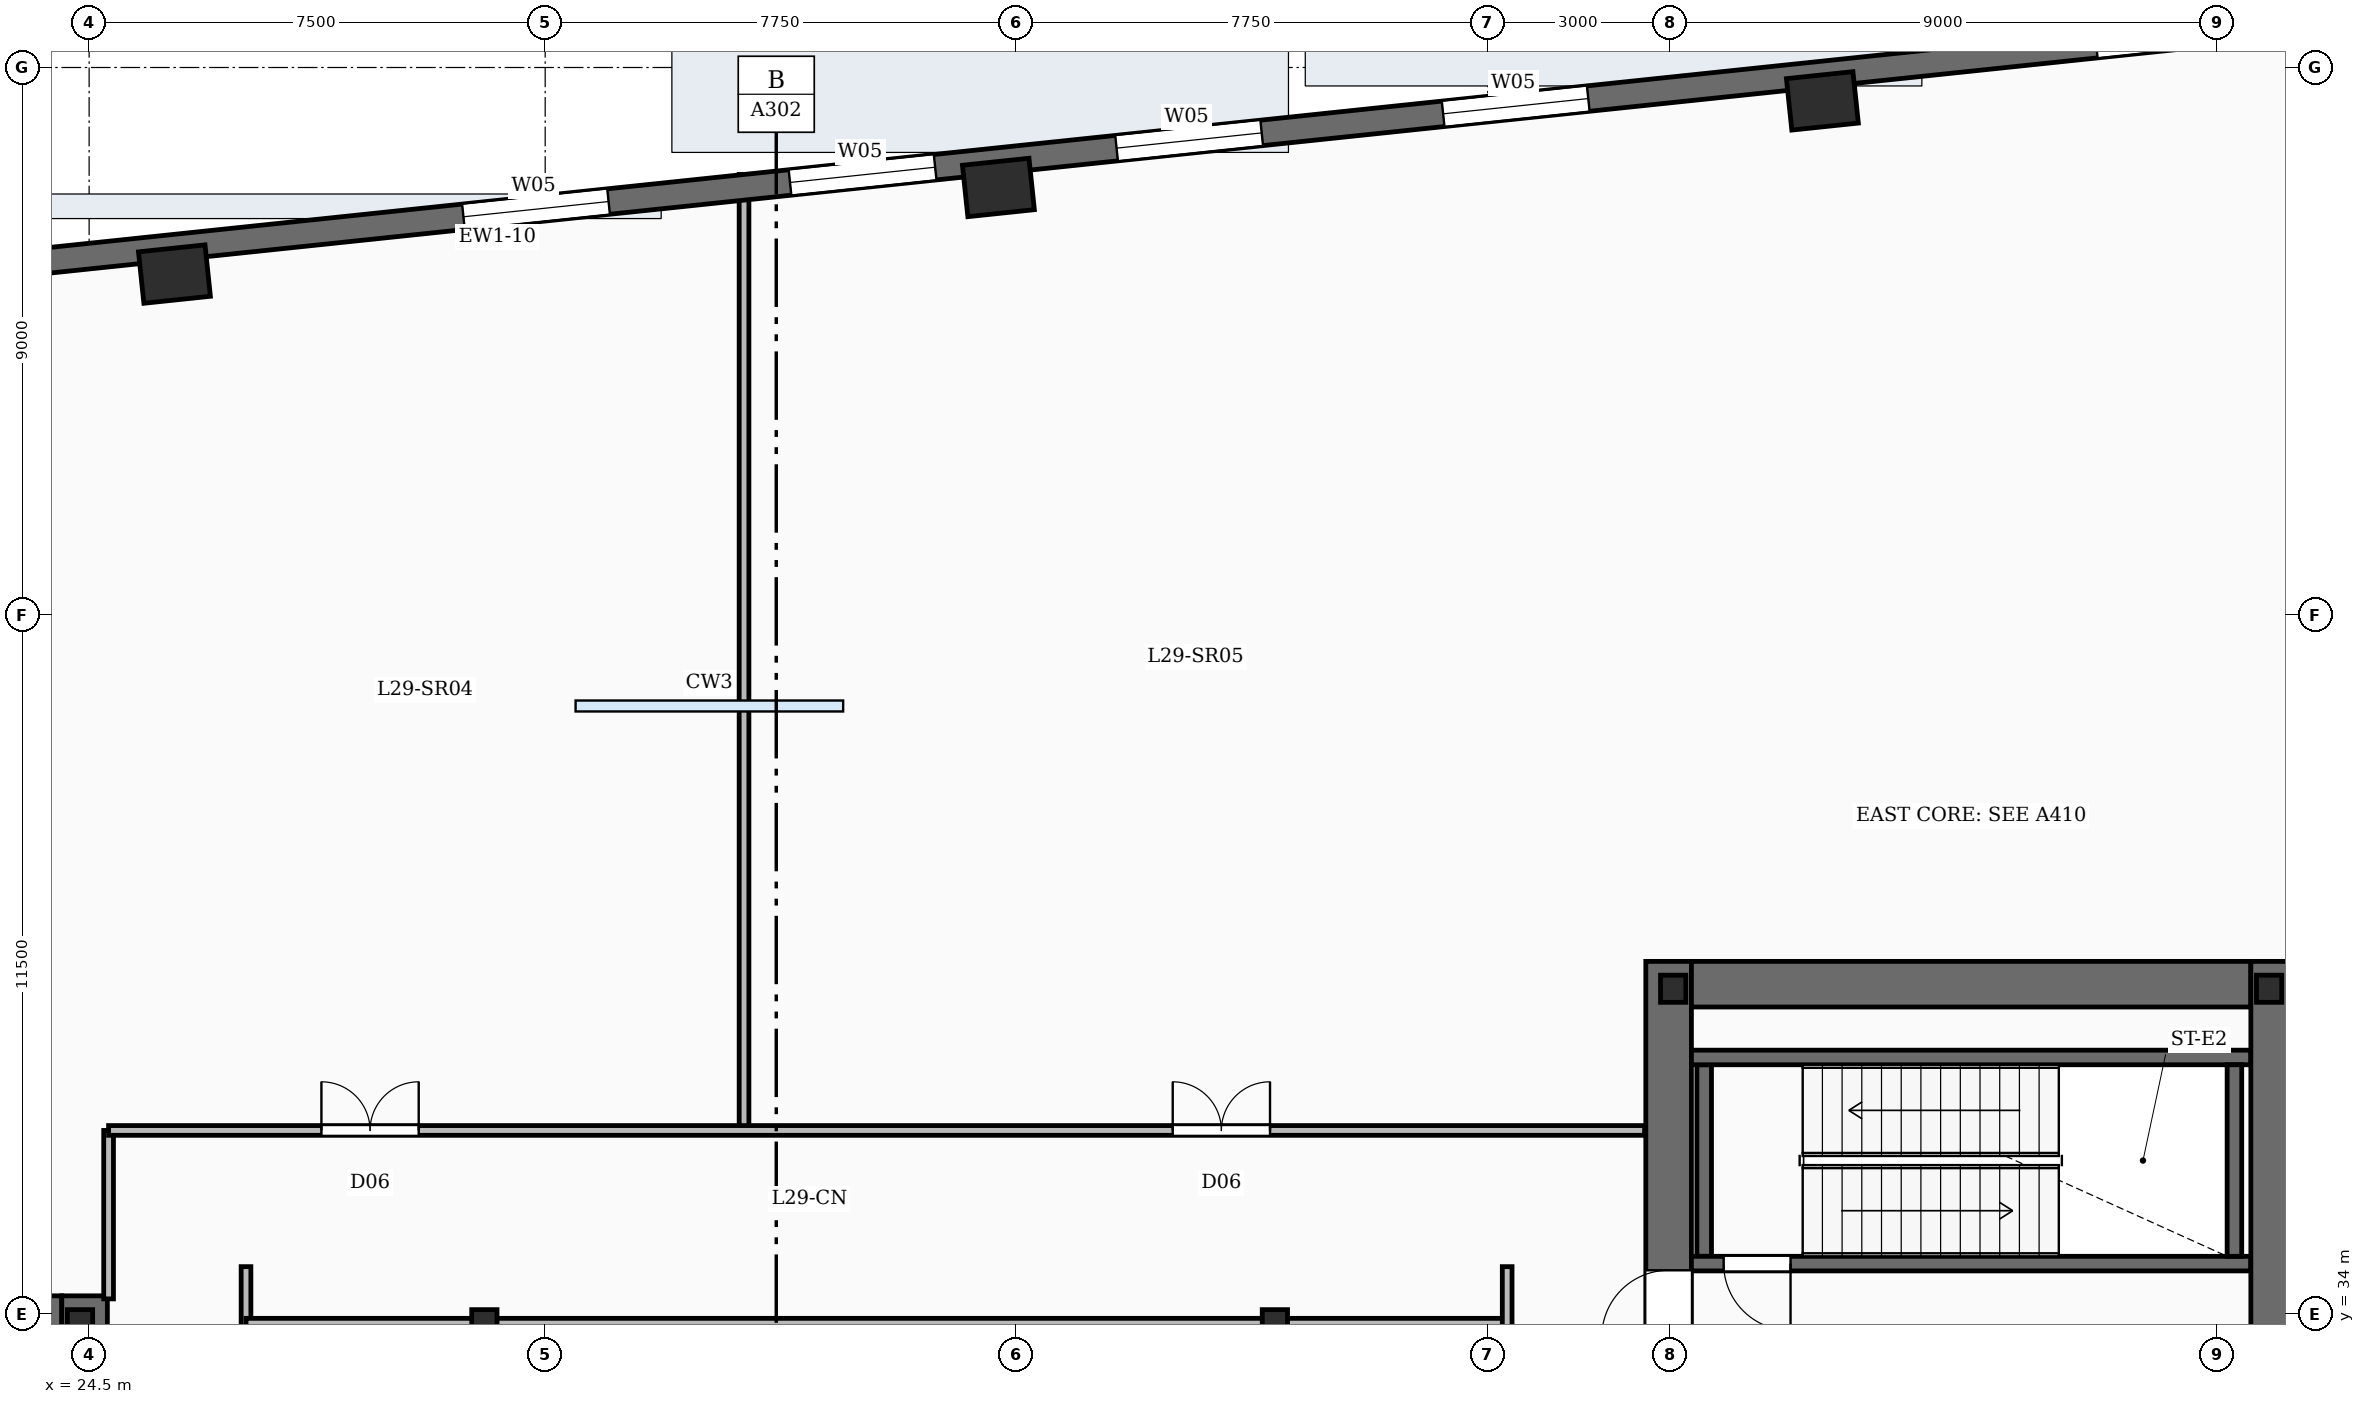
"""IFC4 building model, lengths in metres.
Left out: names, types, materials, properties, quantities, classifications, styles, units other than length and angle.
Written with IfcOpenShell. Run it as: python <this file> out.ifc"""

import sys

from ifc_helpers import new_model, si_unit, direction, frame, frame_2d, origin, origin_2d, place, context, subcontext, project, spatial, rectangle, i_section, extrude, element, fill, save


model = new_model("IFC4")
c1 = context("Model", 3, precision=1e-05, world=origin(), true_north=direction((0.0, 1.0)))
c2 = subcontext(c1, "Body", "Model", "MODEL_VIEW")
j1 = project(units=[si_unit("LENGTHUNIT", "METRE"), si_unit("PLANEANGLEUNIT", "RADIAN")], contexts=[c1])
p1 = place(None, origin())
s1 = spatial("IfcSite", under=j1, at=p1, CompositionType="ELEMENT")
p2 = place(p1, origin())
s2 = spatial("IfcBuilding", under=s1, at=p2, CompositionType="ELEMENT")
p3 = place(p2, frame((0.0, 0.0, 125.95)))
s3 = spatial("IfcBuildingStorey", under=s2, at=p3, CompositionType="ELEMENT", Elevation=125.95)
p4 = place(p3, frame((24.425, 19.0, -0.31), z_axis=(0.0, 0.0, 1.0), x_axis=(0.0, 1.0, 0.0)))
e1 = element("IfcWall", 1, at=p4, inside=s3, PredefinedType="SHEAR", context=c2, shape_type="SweptSolid", body=[
    extrude(rectangle(XDim=15.3, YDim=0.75, at=frame_2d((7.65, 0.0))), origin(), (0.0, 0.0, 1.0), 4.84),
])
p5 = place(p4, frame((2.5, 0.0, 0.31)))
e2 = element("IfcOpeningElement", 2, at=p5, cuts=e1, PredefinedType="OPENING", context=c2, shape_type="SweptSolid", body=[
    extrude(rectangle(XDim=1.05, YDim=2.15, at=frame_2d((0.525, 1.075))), frame((0.0, 0.385, 0.0), z_axis=(0.0, -1.0, 0.0), x_axis=(1.0, 0.0, 0.0)), (0.0, 0.0, 1.0), 0.77),
])
p6 = place(p4, frame((7.0, 0.0, 0.31)))
e3 = element("IfcOpeningElement", 3, at=p6, cuts=e1, PredefinedType="OPENING", context=c2, shape_type="SweptSolid", body=[
    extrude(rectangle(XDim=1.05, YDim=2.15, at=frame_2d((0.525, 1.075))), frame((0.0, 0.385, 0.0), z_axis=(0.0, -1.0, 0.0), x_axis=(1.0, 0.0, 0.0)), (0.0, 0.0, 1.0), 0.77),
])
p7 = place(p3, frame((14.85, 33.925, -0.31), z_axis=(0.0, 0.0, 1.0), x_axis=(1.0, 0.0, 0.0)))
e4 = element("IfcWall", 4, at=p7, inside=s3, PredefinedType="SHEAR", context=c2, shape_type="SweptSolid", body=[
    extrude(rectangle(XDim=9.2, YDim=0.75, at=frame_2d((4.6, 0.0))), origin(), (0.0, 0.0, 1.0), 4.84),
])
p8 = place(p3, frame((50.475, 19.0, -0.31), z_axis=(0.0, 0.0, 1.0), x_axis=(0.0, 1.0, 0.0)))
e5 = element("IfcWall", 5, at=p8, inside=s3, PredefinedType="SHEAR", context=c2, shape_type="SweptSolid", body=[
    extrude(rectangle(XDim=20.8, YDim=0.75, at=frame_2d((10.4, 0.0))), origin(), (0.0, 0.0, 1.0), 4.84),
])
p9 = place(p8, frame((2.5, 0.0, 0.31)))
e6 = element("IfcOpeningElement", 6, at=p9, cuts=e5, PredefinedType="OPENING", context=c2, shape_type="SweptSolid", body=[
    extrude(rectangle(XDim=1.05, YDim=2.15, at=frame_2d((0.525, 1.075))), frame((0.0, 0.385, 0.0), z_axis=(0.0, -1.0, 0.0), x_axis=(1.0, 0.0, 0.0)), (0.0, 0.0, 1.0), 0.77),
])
p10 = place(p8, frame((8.65, 0.0, 0.31)))
e7 = element("IfcOpeningElement", 7, at=p10, cuts=e5, PredefinedType="OPENING", context=c2, shape_type="SweptSolid", body=[
    extrude(rectangle(XDim=1.05, YDim=2.15, at=frame_2d((0.525, 1.075))), frame((0.0, 0.385, 0.0), z_axis=(0.0, -1.0, 0.0), x_axis=(1.0, 0.0, 0.0)), (0.0, 0.0, 1.0), 0.77),
])
p11 = place(p8, frame((14.62, 0.0, 0.31)))
e8 = element("IfcOpeningElement", 8, at=p11, cuts=e5, PredefinedType="OPENING", context=c2, shape_type="SweptSolid", body=[
    extrude(rectangle(XDim=1.1, YDim=2.15, at=frame_2d((0.55, 1.075))), frame((0.0, 0.385, 0.0), z_axis=(0.0, -1.0, 0.0), x_axis=(1.0, 0.0, 0.0)), (0.0, 0.0, 1.0), 0.77),
])
p12 = place(p3, frame((60.425, 19.0, -0.31), z_axis=(0.0, 0.0, 1.0), x_axis=(0.0, 1.0, 0.0)))
e9 = element("IfcWall", 9, at=p12, inside=s3, PredefinedType="SHEAR", context=c2, shape_type="SweptSolid", body=[
    extrude(rectangle(XDim=20.8, YDim=0.75, at=frame_2d((10.4, 0.0))), origin(), (0.0, 0.0, 1.0), 4.84),
])
p13 = place(p3, frame((50.85, 39.425, -0.31), z_axis=(0.0, 0.0, 1.0), x_axis=(1.0, 0.0, 0.0)))
e10 = element("IfcWall", 10, at=p13, inside=s3, PredefinedType="SHEAR", context=c2, shape_type="SweptSolid", body=[
    extrude(rectangle(XDim=9.2, YDim=0.75, at=frame_2d((4.6, 0.0))), origin(), (0.0, 0.0, 1.0), 4.84),
])
for number, where, z_axis, x_axis in (
    (11, (24.35, 33.85, -0.31), (0.0, 0.0, 1.0), (1.0, 0.0, 0.0)),
    (12, (50.55, 39.35, -0.31), (0.0, 0.0, 1.0), (1.0, 0.0, 0.0)),
    (13, (60.35, 39.35, -0.31), (0.0, 0.0, 1.0), (1.0, 0.0, 0.0)),
    (14, (31.0, 33.85, -0.31), (0.0, 0.0, 1.0), (1.0, 0.0, 0.0)),
    (15, (44.0, 33.85, -0.31), (0.0, 0.0, 1.0), (1.0, 0.0, 0.0)),
):
    element("IfcColumn", number, at=place(p3, frame(where, z_axis=z_axis, x_axis=x_axis)), inside=s3, PredefinedType="COLUMN", context=c2, shape_type="SweptSolid", body=[
        extrude(i_section(OverallWidth=0.416, OverallDepth=0.446, WebThickness=0.039, FlangeThickness=0.063, FilletRadius=0.02, at=origin_2d()), origin(), (0.0, 0.0, 1.0), 4.84),
    ])
for number, where, z_axis, x_axis in (
    (16, (53.004, 53.951, -0.31), (0.0, 0.0, 1.0), (0.995, 0.105, 0.0)),
    (17, (39.453, 52.527, -0.31), (0.0, 0.0, 1.0), (0.995, 0.105, 0.0)),
    (18, (25.903, 51.103, -0.31), (0.0, 0.0, 1.0), (0.995, 0.105, 0.0)),
):
    element("IfcColumn", number, at=place(p3, frame(where, z_axis=z_axis, x_axis=x_axis)), inside=s3, PredefinedType="COLUMN", context=c2, shape_type="SweptSolid", body=[
        extrude(rectangle(XDim=1.1, YDim=0.85, at=origin_2d()), origin(), (0.0, 0.0, 1.0), 4.84),
    ])
p14 = place(p3, frame((11.958, 50.08, 0.0), z_axis=(0.0, 0.0, 1.0), x_axis=(0.994521823388, 0.104529148113, 0.0)))
e19 = element("IfcWall", 19, at=p14, inside=s3, PredefinedType="SOLIDWALL", context=c2, shape_type="SweptSolid", body=[
    extrude(rectangle(XDim=55.2, YDim=0.42, at=frame_2d((27.6, 0.0))), origin(), (0.0, 0.0, 1.0), 4.53),
])
p15 = place(p14, frame((2.6, 0.0, 0.85)))
e20 = element("IfcOpeningElement", 20, at=p15, cuts=e19, PredefinedType="OPENING", context=c2, shape_type="SweptSolid", body=[
    extrude(rectangle(XDim=2.4, YDim=3.0, at=frame_2d((1.2, 1.5))), frame((0.0, 0.22, 0.0), z_axis=(0.0, -1.0, 0.0), x_axis=(1.0, 0.0, 0.0)), (0.0, 0.0, 1.0), 0.44),
])
p16 = place(p14, frame((8.0, 0.0, 0.85)))
e21 = element("IfcOpeningElement", 21, at=p16, cuts=e19, PredefinedType="OPENING", context=c2, shape_type="SweptSolid", body=[
    extrude(rectangle(XDim=2.4, YDim=3.0, at=frame_2d((1.2, 1.5))), frame((0.0, 0.22, 0.0), z_axis=(0.0, -1.0, 0.0), x_axis=(1.0, 0.0, 0.0)), (0.0, 0.0, 1.0), 0.44),
])
p17 = place(p14, frame((18.8, 0.0, 0.85)))
e22 = element("IfcOpeningElement", 22, at=p17, cuts=e19, PredefinedType="OPENING", context=c2, shape_type="SweptSolid", body=[
    extrude(rectangle(XDim=2.4, YDim=3.0, at=frame_2d((1.2, 1.5))), frame((0.0, 0.22, 0.0), z_axis=(0.0, -1.0, 0.0), x_axis=(1.0, 0.0, 0.0)), (0.0, 0.0, 1.0), 0.44),
])
p18 = place(p14, frame((24.2, 0.0, 0.85)))
e23 = element("IfcOpeningElement", 23, at=p18, cuts=e19, PredefinedType="OPENING", context=c2, shape_type="SweptSolid", body=[
    extrude(rectangle(XDim=2.4, YDim=3.0, at=frame_2d((1.2, 1.5))), frame((0.0, 0.22, 0.0), z_axis=(0.0, -1.0, 0.0), x_axis=(1.0, 0.0, 0.0)), (0.0, 0.0, 1.0), 0.44),
])
p19 = place(p14, frame((29.6, 0.0, 0.85)))
e24 = element("IfcOpeningElement", 24, at=p19, cuts=e19, PredefinedType="OPENING", context=c2, shape_type="SweptSolid", body=[
    extrude(rectangle(XDim=2.4, YDim=3.0, at=frame_2d((1.2, 1.5))), frame((0.0, 0.22, 0.0), z_axis=(0.0, -1.0, 0.0), x_axis=(1.0, 0.0, 0.0)), (0.0, 0.0, 1.0), 0.44),
])
p20 = place(p14, frame((35.0, 0.0, 0.85)))
e25 = element("IfcOpeningElement", 25, at=p20, cuts=e19, PredefinedType="OPENING", context=c2, shape_type="SweptSolid", body=[
    extrude(rectangle(XDim=2.4, YDim=3.0, at=frame_2d((1.2, 1.5))), frame((0.0, 0.22, 0.0), z_axis=(0.0, -1.0, 0.0), x_axis=(1.0, 0.0, 0.0)), (0.0, 0.0, 1.0), 0.44),
])
p21 = place(p14, frame((45.8, 0.0, 0.85)))
e26 = element("IfcOpeningElement", 26, at=p21, cuts=e19, PredefinedType="OPENING", context=c2, shape_type="SweptSolid", body=[
    extrude(rectangle(XDim=2.4, YDim=3.0, at=frame_2d((1.2, 1.5))), frame((0.0, 0.22, 0.0), z_axis=(0.0, -1.0, 0.0), x_axis=(1.0, 0.0, 0.0)), (0.0, 0.0, 1.0), 0.44),
])
p22 = place(p3, frame((60.05, 34.83, 0.0), z_axis=(0.0, 0.0, 1.0), x_axis=(-1.0, 0.0, 0.0)))
e27 = element("IfcWall", 27, at=p22, inside=s3, PredefinedType="SOLIDWALL", context=c2, shape_type="SweptSolid", body=[
    extrude(rectangle(XDim=9.2, YDim=0.24, at=frame_2d((4.6, 0.0))), origin(), (0.0, 0.0, 1.0), 4.53),
])
p23 = place(p22, frame((7.57, 0.0, 0.0)))
e28 = element("IfcOpeningElement", 28, at=p23, cuts=e27, PredefinedType="OPENING", context=c2, shape_type="SweptSolid", body=[
    extrude(rectangle(XDim=1.1, YDim=2.15, at=frame_2d((0.55, 1.075))), frame((0.0, 0.13, 0.0), z_axis=(0.0, -1.0, 0.0), x_axis=(1.0, 0.0, 0.0)), (0.0, 0.0, 1.0), 0.26),
])
p24 = place(p3, frame((50.85, 38.22, 0.0), z_axis=(0.0, 0.0, 1.0), x_axis=(1.0, 0.0, 0.0)))
e29 = element("IfcWall", 29, at=p24, inside=s3, PredefinedType="SOLIDWALL", context=c2, shape_type="SweptSolid", body=[
    extrude(rectangle(XDim=9.2, YDim=0.24, at=frame_2d((4.6, 0.0))), origin(), (0.0, 0.0, 1.0), 4.53),
])
for number, where, z_axis, x_axis in (
    (30, (51.06, 34.95, 0.0), (0.0, 0.0, 1.0), (0.0, 1.0, 0.0)),
    (31, (59.78, 34.95, 0.0), (0.0, 0.0, 1.0), (0.0, 1.0, 0.0)),
):
    element("IfcWall", number, at=place(p3, frame(where, z_axis=z_axis, x_axis=x_axis)), inside=s3, PredefinedType="SOLIDWALL", context=c2, shape_type="SweptSolid", body=[
        extrude(rectangle(XDim=3.15, YDim=0.24, at=frame_2d((1.575, 0.0))), origin(), (0.0, 0.0, 1.0), 4.53),
    ])
p25 = place(p3, frame((27.08, 33.85, 0.0), z_axis=(0.0, 0.0, 1.0), x_axis=(1.0, 0.0, 0.0)))
e32 = element("IfcWall", 32, at=p25, inside=s3, PredefinedType="PARTITIONING", context=c2, shape_type="SweptSolid", body=[
    extrude(rectangle(XDim=20.74, YDim=0.16, at=frame_2d((10.37, 0.0))), origin(), (0.0, 0.0, 1.0), 3.59),
])
p26 = place(p3, frame((35.27, 19.42, 0.0), z_axis=(0.0, 0.0, 1.0), x_axis=(0.0, 1.0, 0.0)))
e33 = element("IfcWall", 33, at=p26, inside=s3, PredefinedType="PARTITIONING", context=c2, shape_type="SweptSolid", body=[
    extrude(rectangle(XDim=14.43, YDim=0.135, at=frame_2d((7.215, 0.0))), origin(), (0.0, 0.0, 1.0), 3.59),
])
for number, where, z_axis, x_axis in (
    (34, (27.08, 15.38, 0.0), (0.0, 0.0, 1.0), (0.0, 1.0, 0.0)),
    (35, (47.82, 15.38, 0.0), (0.0, 0.0, 1.0), (0.0, 1.0, 0.0)),
):
    element("IfcWall", number, at=place(p3, frame(where, z_axis=z_axis, x_axis=x_axis)), inside=s3, PredefinedType="PARTITIONING", context=c2, shape_type="SweptSolid", body=[
        extrude(rectangle(XDim=19.4, YDim=0.16, at=frame_2d((9.7, 0.0))), origin(), (0.0, 0.0, 1.0), 3.59),
    ])
p27 = place(p3, frame((24.82, 34.25, 0.0), z_axis=(0.0, 0.0, 1.0), x_axis=(0.0, 1.0, 0.0)))
e36 = element("IfcWall", 36, at=p27, inside=s3, PredefinedType="PARTITIONING", context=c2, shape_type="SweptSolid", body=[
    extrude(rectangle(XDim=2.77, YDim=0.16, at=frame_2d((1.385, 0.0))), origin(), (0.0, 0.0, 1.0), 3.59),
])
p28 = place(p3, frame((24.82, 37.02, 0.0), z_axis=(0.0, 0.0, 1.0), x_axis=(1.0, 0.0, 0.0)))
e37 = element("IfcWall", 37, at=p28, inside=s3, PredefinedType="PARTITIONING", context=c2, shape_type="SweptSolid", body=[
    extrude(rectangle(XDim=25.26, YDim=0.16, at=frame_2d((12.63, 0.0))), origin(), (0.0, 0.0, 1.0), 3.59),
])
p29 = place(p28, frame((3.5, 0.0, 0.0)))
e38 = element("IfcOpeningElement", 38, at=p29, cuts=e37, PredefinedType="OPENING", context=c2, shape_type="SweptSolid", body=[
    extrude(rectangle(XDim=1.6, YDim=2.15, at=frame_2d((0.8, 1.075))), frame((0.0, 0.09, 0.0), z_axis=(0.0, -1.0, 0.0), x_axis=(1.0, 0.0, 0.0)), (0.0, 0.0, 1.0), 0.18),
])
p30 = place(p28, frame((17.5, 0.0, 0.0)))
e39 = element("IfcOpeningElement", 39, at=p30, cuts=e37, PredefinedType="OPENING", context=c2, shape_type="SweptSolid", body=[
    extrude(rectangle(XDim=1.6, YDim=2.15, at=frame_2d((0.8, 1.075))), frame((0.0, 0.09, 0.0), z_axis=(0.0, -1.0, 0.0), x_axis=(1.0, 0.0, 0.0)), (0.0, 0.0, 1.0), 0.18),
])
p31 = place(p3, frame((35.27, 37.02, 0.0), z_axis=(0.0, 0.0, 1.0), x_axis=(0.0, 1.0, 0.0)))
e40 = element("IfcWall", 40, at=p31, inside=s3, PredefinedType="PARTITIONING", context=c2, shape_type="SweptSolid", body=[
    extrude(rectangle(XDim=15.721, YDim=0.16, at=frame_2d((7.86, 0.0))), origin(), (0.0, 0.0, 1.0), 3.59),
])
p32 = place(p17, origin())
e41 = element("IfcWindow", 41, at=p32, inside=s3, PartitioningType="DOUBLE_PANEL_VERTICAL", PredefinedType="WINDOW", context=c2, shape_type="SweptSolid", body=[
    extrude(rectangle(XDim=2.4, YDim=3.0, at=frame_2d((1.2, 1.5))), frame((0.0, 0.03, 0.0), z_axis=(0.0, -1.0, 0.0), x_axis=(1.0, 0.0, 0.0)), (0.0, 0.0, 1.0), 0.06),
])
fill(e22, e41)
p33 = place(p18, origin())
e42 = element("IfcWindow", 42, at=p33, inside=s3, PartitioningType="DOUBLE_PANEL_VERTICAL", PredefinedType="WINDOW", context=c2, shape_type="SweptSolid", body=[
    extrude(rectangle(XDim=2.4, YDim=3.0, at=frame_2d((1.2, 1.5))), frame((0.0, 0.03, 0.0), z_axis=(0.0, -1.0, 0.0), x_axis=(1.0, 0.0, 0.0)), (0.0, 0.0, 1.0), 0.06),
])
fill(e23, e42)
p34 = place(p19, origin())
e43 = element("IfcWindow", 43, at=p34, inside=s3, PartitioningType="DOUBLE_PANEL_VERTICAL", PredefinedType="WINDOW", context=c2, shape_type="SweptSolid", body=[
    extrude(rectangle(XDim=2.4, YDim=3.0, at=frame_2d((1.2, 1.5))), frame((0.0, 0.03, 0.0), z_axis=(0.0, -1.0, 0.0), x_axis=(1.0, 0.0, 0.0)), (0.0, 0.0, 1.0), 0.06),
])
fill(e24, e43)
p35 = place(p20, origin())
e44 = element("IfcWindow", 44, at=p35, inside=s3, PartitioningType="DOUBLE_PANEL_VERTICAL", PredefinedType="WINDOW", context=c2, shape_type="SweptSolid", body=[
    extrude(rectangle(XDim=2.4, YDim=3.0, at=frame_2d((1.2, 1.5))), frame((0.0, 0.03, 0.0), z_axis=(0.0, -1.0, 0.0), x_axis=(1.0, 0.0, 0.0)), (0.0, 0.0, 1.0), 0.06),
])
fill(e25, e44)
p36 = place(p11, origin())
e45 = element("IfcDoor", 45, at=p36, inside=s3, OperationType="SINGLE_SWING_LEFT", PredefinedType="DOOR", context=c2, shape_type="SweptSolid", body=[
    extrude(rectangle(XDim=1.1, YDim=2.15, at=frame_2d((0.55, 1.075))), frame((0.0, 0.025, 0.0), z_axis=(0.0, -1.0, 0.0), x_axis=(1.0, 0.0, 0.0)), (0.0, 0.0, 1.0), 0.05),
])
fill(e8, e45)
p37 = place(p23, origin())
e46 = element("IfcDoor", 46, at=p37, inside=s3, OperationType="SINGLE_SWING_LEFT", PredefinedType="DOOR", context=c2, shape_type="SweptSolid", body=[
    extrude(rectangle(XDim=1.1, YDim=2.15, at=frame_2d((0.55, 1.075))), frame((0.0, 0.025, 0.0), z_axis=(0.0, -1.0, 0.0), x_axis=(1.0, 0.0, 0.0)), (0.0, 0.0, 1.0), 0.05),
])
fill(e28, e46)
p38 = place(p29, origin())
e47 = element("IfcDoor", 47, at=p38, inside=s3, OperationType="DOUBLE_DOOR_SINGLE_SWING", PredefinedType="DOOR", context=c2, shape_type="SweptSolid", body=[
    extrude(rectangle(XDim=1.6, YDim=2.15, at=frame_2d((0.8, 1.075))), frame((0.0, 0.025, 0.0), z_axis=(0.0, -1.0, 0.0), x_axis=(1.0, 0.0, 0.0)), (0.0, 0.0, 1.0), 0.05),
])
fill(e38, e47)
p39 = place(p30, origin())
e48 = element("IfcDoor", 48, at=p39, inside=s3, OperationType="DOUBLE_DOOR_SINGLE_SWING", PredefinedType="DOOR", context=c2, shape_type="SweptSolid", body=[
    extrude(rectangle(XDim=1.6, YDim=2.15, at=frame_2d((0.8, 1.075))), frame((0.0, 0.025, 0.0), z_axis=(0.0, -1.0, 0.0), x_axis=(1.0, 0.0, 0.0)), (0.0, 0.0, 1.0), 0.05),
])
fill(e39, e48)
save(model, sys.argv[1])
